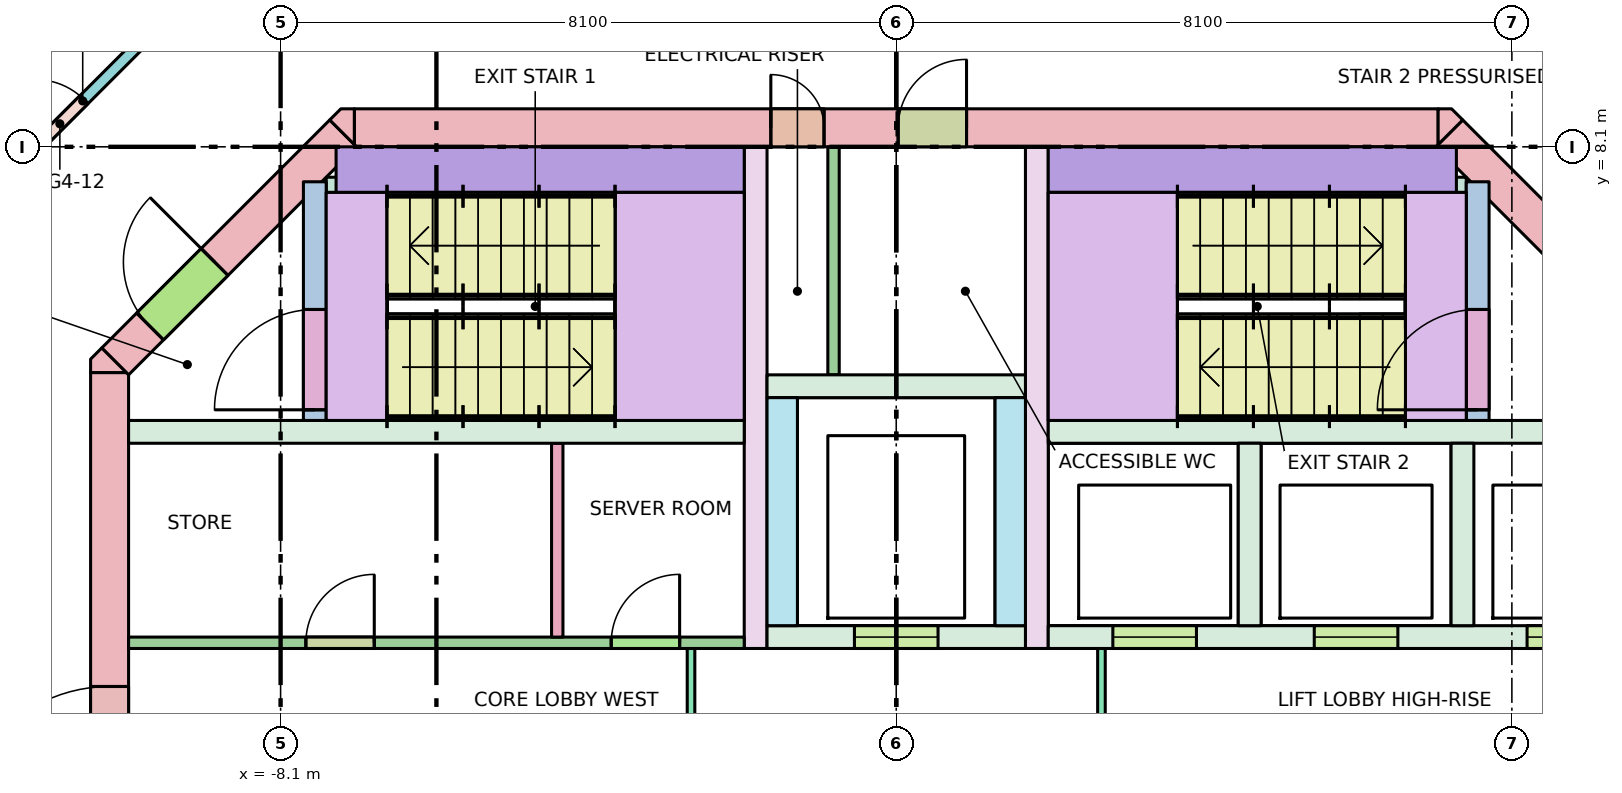
"""IFC4 building model, lengths in metres.
Left out: names, types, materials, properties, quantities, classifications, styles, units other than length and angle.
Written with IfcOpenShell. Run it as: python <this file> out.ifc"""

import sys

from ifc_helpers import new_model, si_unit, direction, frame, frame_2d, origin, place, context, subcontext, project, spatial, polyline, rectangle, outline, extrude, element, fill, save


model = new_model("IFC4")
c1 = context("Model", 3, precision=1e-05, world=origin(), true_north=direction((0.0, 1.0)))
c2 = subcontext(c1, "Body", "Model", "MODEL_VIEW")
j1 = project(units=[si_unit("LENGTHUNIT", "METRE"), si_unit("PLANEANGLEUNIT", "RADIAN")], contexts=[c1])
p1 = place(None, origin())
s1 = spatial("IfcSite", under=j1, at=p1, CompositionType="ELEMENT")
p2 = place(p1, origin())
s2 = spatial("IfcBuilding", under=s1, at=p2, CompositionType="ELEMENT")
p3 = place(p2, frame((0.0, 0.0, 276.0)))
s3 = spatial("IfcBuildingStorey", under=s2, at=p3, CompositionType="ELEMENT", Elevation=276.0)
p4 = place(p3, frame((-7.13, 8.35, -0.28), z_axis=(0.0, 0.0, 1.0), x_axis=(1.0, 0.0, 0.0)))
e1 = element("IfcWall", 1, at=p4, inside=s3, PredefinedType="SHEAR", context=c2, shape_type="SweptSolid", body=[
    extrude(rectangle(XDim=14.26, YDim=0.5, at=frame_2d((7.13, 0.0))), origin(), (0.0, 0.0, 1.0), 7.4),
])
p5 = place(p4, frame((5.48, 0.0, 0.28)))
e2 = element("IfcOpeningElement", 2, at=p5, cuts=e1, PredefinedType="OPENING", context=c2, shape_type="SweptSolid", body=[
    extrude(rectangle(XDim=0.7, YDim=2.1, at=frame_2d((0.35, 1.05))), frame((0.0, 0.26, 0.0), z_axis=(0.0, -1.0, 0.0), x_axis=(1.0, 0.0, 0.0)), (0.0, 0.0, 1.0), 0.52),
])
p6 = place(p4, frame((7.155, 0.0, 0.28)))
e3 = element("IfcOpeningElement", 3, at=p6, cuts=e1, PredefinedType="OPENING", context=c2, shape_type="SweptSolid", body=[
    extrude(rectangle(XDim=0.9, YDim=2.1, at=frame_2d((0.45, 1.05))), frame((0.0, 0.26, 0.0), z_axis=(0.0, -1.0, 0.0), x_axis=(1.0, 0.0, 0.0)), (0.0, 0.0, 1.0), 0.52),
])
p7 = place(p3, frame((-10.35, -5.13, -0.28), z_axis=(0.0, 0.0, 1.0), x_axis=(0.0, 1.0, 0.0)))
e4 = element("IfcWall", 4, at=p7, inside=s3, PredefinedType="SHEAR", context=c2, shape_type="SweptSolid", body=[
    extrude(rectangle(XDim=10.26, YDim=0.5, at=frame_2d((5.13, 0.0))), origin(), (0.0, 0.0, 1.0), 7.4),
])
p8 = place(p7, frame((4.13, 0.0, 0.28)))
e5 = element("IfcOpeningElement", 5, at=p8, cuts=e4, PredefinedType="OPENING", context=c2, shape_type="SweptSolid", body=[
    extrude(rectangle(XDim=2.0, YDim=2.1, at=frame_2d((1.0, 1.05))), frame((0.0, 0.26, 0.0), z_axis=(0.0, -1.0, 0.0), x_axis=(1.0, 0.0, 0.0)), (0.0, 0.0, 1.0), 0.52),
])
p9 = place(p3, frame((-10.277, 5.277, -0.28), z_axis=(0.0, 0.0, 1.0), x_axis=(0.707106781187, 0.707106781187, 0.0)))
e6 = element("IfcWall", 6, at=p9, inside=s3, PredefinedType="SHEAR", context=c2, shape_type="SweptSolid", body=[
    extrude(rectangle(XDim=4.243, YDim=0.5, at=frame_2d((2.121, 0.0))), origin(), (0.0, 0.0, 1.0), 7.4),
])
p10 = place(p9, frame((0.65, 0.0, 0.28)))
e7 = element("IfcOpeningElement", 7, at=p10, cuts=e6, PredefinedType="OPENING", context=c2, shape_type="SweptSolid", body=[
    extrude(rectangle(XDim=1.2, YDim=2.1, at=frame_2d((0.6, 1.05))), frame((0.0, 0.26, 0.0), z_axis=(0.0, -1.0, 0.0), x_axis=(1.0, 0.0, 0.0)), (0.0, 0.0, 1.0), 0.52),
])
p11 = place(p3, frame((7.277, 8.277, -0.28), z_axis=(0.0, 0.0, 1.0), x_axis=(0.707106781187, -0.707106781187, 0.0)))
e8 = element("IfcWall", 8, at=p11, inside=s3, PredefinedType="SHEAR", context=c2, shape_type="SweptSolid", body=[
    extrude(rectangle(XDim=4.243, YDim=0.5, at=frame_2d((2.121, 0.0))), origin(), (0.0, 0.0, 1.0), 7.4),
])
p12 = place(p11, frame((2.393, 0.0, 0.28)))
e9 = element("IfcOpeningElement", 9, at=p12, cuts=e8, PredefinedType="OPENING", context=c2, shape_type="SweptSolid", body=[
    extrude(rectangle(XDim=1.2, YDim=2.1, at=frame_2d((0.6, 1.05))), frame((0.0, 0.26, 0.0), z_axis=(0.0, -1.0, 0.0), x_axis=(1.0, 0.0, 0.0)), (0.0, 0.0, 1.0), 0.52),
])
p13 = place(p3, frame((0.0, 0.0, -0.28)))
e10 = element("IfcWall", 10, at=p13, inside=s3, PredefinedType="SHEAR", context=c2, shape_type="SweptSolid", body=[
    extrude(outline(polyline([(-10.454, 5.454), (-10.13, 5.13), (-10.6, 5.13), (-10.6, 5.307), (-10.454, 5.454)])), origin(), (0.0, 0.0, 1.0), 7.4),
])
p14 = place(p3, frame((0.0, 0.0, -0.28)))
e11 = element("IfcWall", 11, at=p14, inside=s3, PredefinedType="SHEAR", context=c2, shape_type="SweptSolid", body=[
    extrude(outline(polyline([(-7.307, 8.6), (-7.13, 8.6), (-7.13, 8.13), (-7.454, 8.454), (-7.307, 8.6)])), origin(), (0.0, 0.0, 1.0), 7.4),
])
p15 = place(p3, frame((0.0, 0.0, -0.28)))
e12 = element("IfcWall", 12, at=p15, inside=s3, PredefinedType="SHEAR", context=c2, shape_type="SweptSolid", body=[
    extrude(outline(polyline([(7.307, 8.6), (7.454, 8.454), (7.13, 8.13), (7.13, 8.6), (7.307, 8.6)])), origin(), (0.0, 0.0, 1.0), 7.4),
])
for number, where, z_axis, x_axis in (
    (13, (-10.1, 4.35, 0.0), (0.0, 0.0, 1.0), (1.0, 0.0, 0.0)),
    (14, (2.0, 4.35, 0.0), (0.0, 0.0, 1.0), (1.0, 0.0, 0.0)),
):
    element("IfcWall", number, at=place(p3, frame(where, z_axis=z_axis, x_axis=x_axis)), inside=s3, PredefinedType="SOLIDWALL", context=c2, shape_type="SweptSolid", body=[
        extrude(rectangle(XDim=8.1, YDim=0.3, at=frame_2d((4.05, 0.0))), origin(), (0.0, 0.0, 1.0), 7.12),
    ])
p16 = place(p3, frame((2.0, 1.65, 0.0), z_axis=(0.0, 0.0, 1.0), x_axis=(1.0, 0.0, 0.0)))
e15 = element("IfcWall", 15, at=p16, inside=s3, PredefinedType="SOLIDWALL", context=c2, shape_type="SweptSolid", body=[
    extrude(rectangle(XDim=8.1, YDim=0.3, at=frame_2d((4.05, 0.0))), origin(), (0.0, 0.0, 1.0), 7.12),
])
p17 = place(p16, frame((0.85, 0.0, 0.0)))
e16 = element("IfcOpeningElement", 16, at=p17, cuts=e15, PredefinedType="OPENING", context=c2, shape_type="SweptSolid", body=[
    extrude(rectangle(XDim=1.1, YDim=2.1, at=frame_2d((0.55, 1.05))), frame((0.0, 0.16, 0.0), z_axis=(0.0, -1.0, 0.0), x_axis=(1.0, 0.0, 0.0)), (0.0, 0.0, 1.0), 0.32),
])
p18 = place(p16, frame((3.5, 0.0, 0.0)))
e17 = element("IfcOpeningElement", 17, at=p18, cuts=e15, PredefinedType="OPENING", context=c2, shape_type="SweptSolid", body=[
    extrude(rectangle(XDim=1.1, YDim=2.1, at=frame_2d((0.55, 1.05))), frame((0.0, 0.16, 0.0), z_axis=(0.0, -1.0, 0.0), x_axis=(1.0, 0.0, 0.0)), (0.0, 0.0, 1.0), 0.32),
])
p19 = place(p16, frame((6.3, 0.0, 0.0)))
e18 = element("IfcOpeningElement", 18, at=p19, cuts=e15, PredefinedType="OPENING", context=c2, shape_type="SweptSolid", body=[
    extrude(rectangle(XDim=1.1, YDim=2.1, at=frame_2d((0.55, 1.05))), frame((0.0, 0.16, 0.0), z_axis=(0.0, -1.0, 0.0), x_axis=(1.0, 0.0, 0.0)), (0.0, 0.0, 1.0), 0.32),
])
for number, where, z_axis, x_axis in (
    (19, (4.65, 1.8, 0.0), (0.0, 0.0, 1.0), (0.0, 1.0, 0.0)),
    (20, (7.45, 1.8, 0.0), (0.0, 0.0, 1.0), (0.0, 1.0, 0.0)),
):
    element("IfcWall", number, at=place(p3, frame(where, z_axis=z_axis, x_axis=x_axis)), inside=s3, PredefinedType="SOLIDWALL", context=c2, shape_type="SweptSolid", body=[
        extrude(rectangle(XDim=2.4, YDim=0.3, at=frame_2d((1.2, 0.0))), origin(), (0.0, 0.0, 1.0), 7.12),
    ])
for number, where, z_axis, x_axis in (
    (21, (-1.85, 1.5, 0.0), (0.0, 0.0, 1.0), (0.0, 1.0, 0.0)),
    (22, (1.85, 1.5, 0.0), (0.0, 0.0, 1.0), (0.0, 1.0, 0.0)),
):
    element("IfcWall", number, at=place(p3, frame(where, z_axis=z_axis, x_axis=x_axis)), inside=s3, PredefinedType="SHEAR", context=c2, shape_type="SweptSolid", body=[
        extrude(rectangle(XDim=6.6, YDim=0.3, at=frame_2d((3.3, 0.0))), origin(), (0.0, 0.0, 1.0), 7.12),
    ])
p20 = place(p3, frame((-1.7, 1.65, 0.0), z_axis=(0.0, 0.0, 1.0), x_axis=(1.0, 0.0, 0.0)))
e23 = element("IfcWall", 23, at=p20, inside=s3, PredefinedType="SOLIDWALL", context=c2, shape_type="SweptSolid", body=[
    extrude(rectangle(XDim=3.4, YDim=0.3, at=frame_2d((1.7, 0.0))), origin(), (0.0, 0.0, 1.0), 7.12),
])
p21 = place(p20, frame((1.15, 0.0, 0.0)))
e24 = element("IfcOpeningElement", 24, at=p21, cuts=e23, PredefinedType="OPENING", context=c2, shape_type="SweptSolid", body=[
    extrude(rectangle(XDim=1.1, YDim=2.1, at=frame_2d((0.55, 1.05))), frame((0.0, 0.16, 0.0), z_axis=(0.0, -1.0, 0.0), x_axis=(1.0, 0.0, 0.0)), (0.0, 0.0, 1.0), 0.32),
])
for number, where, z_axis, x_axis in (
    (25, (-1.5, 1.8, 0.0), (0.0, 0.0, 1.0), (0.0, 1.0, 0.0)),
    (26, (1.5, 1.8, 0.0), (0.0, 0.0, 1.0), (0.0, 1.0, 0.0)),
):
    element("IfcWall", number, at=place(p3, frame(where, z_axis=z_axis, x_axis=x_axis)), inside=s3, PredefinedType="SOLIDWALL", context=c2, shape_type="SweptSolid", body=[
        extrude(rectangle(XDim=3.0, YDim=0.4, at=frame_2d((1.5, 0.0))), origin(), (0.0, 0.0, 1.0), 7.12),
    ])
p22 = place(p3, frame((-1.7, 4.95, 0.0), z_axis=(0.0, 0.0, 1.0), x_axis=(1.0, 0.0, 0.0)))
e27 = element("IfcWall", 27, at=p22, inside=s3, PredefinedType="SOLIDWALL", context=c2, shape_type="SweptSolid", body=[
    extrude(rectangle(XDim=3.4, YDim=0.3, at=frame_2d((1.7, 0.0))), origin(), (0.0, 0.0, 1.0), 7.12),
])
p23 = place(p3, frame((-7.65, 4.5, 0.0), z_axis=(0.0, 0.0, 1.0), x_axis=(0.0, 1.0, 0.0)))
e28 = element("IfcWall", 28, at=p23, inside=s3, PredefinedType="SHEAR", context=c2, shape_type="SweptSolid", body=[
    extrude(rectangle(XDim=3.14, YDim=0.3, at=frame_2d((1.57, 0.0))), origin(), (0.0, 0.0, 1.0), 7.12),
])
p24 = place(p23, frame((0.14, 0.0, 0.0)))
e29 = element("IfcOpeningElement", 29, at=p24, cuts=e28, PredefinedType="OPENING", context=c2, shape_type="SweptSolid", body=[
    extrude(rectangle(XDim=1.32, YDim=2.1, at=frame_2d((0.66, 1.05))), frame((0.0, 0.16, 0.0), z_axis=(0.0, -1.0, 0.0), x_axis=(1.0, 0.0, 0.0)), (0.0, 0.0, 1.0), 0.32),
])
p25 = place(p3, frame((-7.37, 7.8, 0.0), z_axis=(0.0, 0.0, 1.0), x_axis=(1.0, 0.0, 0.0)))
e30 = element("IfcWall", 30, at=p25, inside=s3, PredefinedType="SHEAR", context=c2, shape_type="SweptSolid", body=[
    extrude(rectangle(XDim=5.37, YDim=0.6, at=frame_2d((2.685, 0.0))), origin(), (0.0, 0.0, 1.0), 7.12),
])
p26 = place(p3, frame((7.65, 4.5, 0.0), z_axis=(0.0, 0.0, 1.0), x_axis=(0.0, 1.0, 0.0)))
e31 = element("IfcWall", 31, at=p26, inside=s3, PredefinedType="SHEAR", context=c2, shape_type="SweptSolid", body=[
    extrude(rectangle(XDim=3.14, YDim=0.3, at=frame_2d((1.57, 0.0))), origin(), (0.0, 0.0, 1.0), 7.12),
])
p27 = place(p26, frame((0.14, 0.0, 0.0)))
e32 = element("IfcOpeningElement", 32, at=p27, cuts=e31, PredefinedType="OPENING", context=c2, shape_type="SweptSolid", body=[
    extrude(rectangle(XDim=1.32, YDim=2.1, at=frame_2d((0.66, 1.05))), frame((0.0, 0.16, 0.0), z_axis=(0.0, -1.0, 0.0), x_axis=(1.0, 0.0, 0.0)), (0.0, 0.0, 1.0), 0.32),
])
p28 = place(p3, frame((2.0, 7.8, 0.0), z_axis=(0.0, 0.0, 1.0), x_axis=(1.0, 0.0, 0.0)))
e33 = element("IfcWall", 33, at=p28, inside=s3, PredefinedType="SHEAR", context=c2, shape_type="SweptSolid", body=[
    extrude(rectangle(XDim=5.37, YDim=0.6, at=frame_2d((2.685, 0.0))), origin(), (0.0, 0.0, 1.0), 7.12),
])
for number, where, z_axis, x_axis in (
    (34, (-7.5, 7.6, 0.0), (0.0, 0.0, 1.0), (1.0, 0.0, 0.0)),
    (35, (6.9, 7.6, 0.0), (0.0, 0.0, 1.0), (1.0, 0.0, 0.0)),
):
    element("IfcWall", number, at=place(p3, frame(where, z_axis=z_axis, x_axis=x_axis)), inside=s3, PredefinedType="SHEAR", context=c2, shape_type="SweptSolid", body=[
        extrude(rectangle(XDim=0.6, YDim=0.2, at=frame_2d((0.3, 0.0))), origin(), (0.0, 0.0, 1.0), 7.12),
    ])
p29 = place(p3, frame((-2.7, -1.5, 0.0), z_axis=(0.0, 0.0, 1.0), x_axis=(0.0, 1.0, 0.0)))
e36 = element("IfcWall", 36, at=p29, inside=s3, PredefinedType="PARTITIONING", context=c2, shape_type="SweptSolid", body=[
    extrude(rectangle(XDim=3.0, YDim=0.1, at=frame_2d((1.5, 0.0))), origin(), (0.0, 0.0, 1.0), 7.12),
])
p30 = place(p29, frame((0.9, 0.0, 0.0)))
e37 = element("IfcOpeningElement", 37, at=p30, cuts=e36, PredefinedType="OPENING", context=c2, shape_type="SweptSolid", body=[
    extrude(rectangle(XDim=1.2, YDim=2.1, at=frame_2d((0.6, 1.05))), frame((0.0, 0.06, 0.0), z_axis=(0.0, -1.0, 0.0), x_axis=(1.0, 0.0, 0.0)), (0.0, 0.0, 1.0), 0.12),
])
p31 = place(p3, frame((2.7, -1.5, 0.0), z_axis=(0.0, 0.0, 1.0), x_axis=(0.0, 1.0, 0.0)))
e38 = element("IfcWall", 38, at=p31, inside=s3, PredefinedType="PARTITIONING", context=c2, shape_type="SweptSolid", body=[
    extrude(rectangle(XDim=3.0, YDim=0.1, at=frame_2d((1.5, 0.0))), origin(), (0.0, 0.0, 1.0), 7.12),
])
p32 = place(p31, frame((0.9, 0.0, 0.0)))
e39 = element("IfcOpeningElement", 39, at=p32, cuts=e38, PredefinedType="OPENING", context=c2, shape_type="SweptSolid", body=[
    extrude(rectangle(XDim=1.2, YDim=2.1, at=frame_2d((0.6, 1.05))), frame((0.0, 0.06, 0.0), z_axis=(0.0, -1.0, 0.0), x_axis=(1.0, 0.0, 0.0)), (0.0, 0.0, 1.0), 0.12),
])
p33 = place(p3, frame((-0.825, 5.1, 0.0), z_axis=(0.0, 0.0, 1.0), x_axis=(0.0, 1.0, 0.0)))
e40 = element("IfcWall", 40, at=p33, inside=s3, PredefinedType="PARTITIONING", context=c2, shape_type="SweptSolid", body=[
    extrude(rectangle(XDim=3.0, YDim=0.15, at=frame_2d((1.5, 0.0))), origin(), (0.0, 0.0, 1.0), 7.12),
])
p34 = place(p3, frame((-4.46, 1.65, 0.0), z_axis=(0.0, 0.0, 1.0), x_axis=(0.0, 1.0, 0.0)))
e41 = element("IfcWall", 41, at=p34, inside=s3, PredefinedType="PARTITIONING", context=c2, shape_type="SweptSolid", body=[
    extrude(rectangle(XDim=2.55, YDim=0.15, at=frame_2d((1.275, 0.0))), origin(), (0.0, 0.0, 1.0), 7.12),
])
p35 = place(p3, frame((-10.1, 1.575, 0.0), z_axis=(0.0, 0.0, 1.0), x_axis=(1.0, 0.0, 0.0)))
e42 = element("IfcWall", 42, at=p35, inside=s3, PredefinedType="PARTITIONING", context=c2, shape_type="SweptSolid", body=[
    extrude(rectangle(XDim=8.1, YDim=0.15, at=frame_2d((4.05, 0.0))), origin(), (0.0, 0.0, 1.0), 7.12),
])
p36 = place(p35, frame((2.333, 0.0, 0.0)))
e43 = element("IfcOpeningElement", 43, at=p36, cuts=e42, PredefinedType="OPENING", context=c2, shape_type="SweptSolid", body=[
    extrude(rectangle(XDim=0.9, YDim=2.1, at=frame_2d((0.45, 1.05))), frame((0.0, 0.085, 0.0), z_axis=(0.0, -1.0, 0.0), x_axis=(1.0, 0.0, 0.0)), (0.0, 0.0, 1.0), 0.17),
])
p37 = place(p35, frame((6.35, 0.0, 0.0)))
e44 = element("IfcOpeningElement", 44, at=p37, cuts=e42, PredefinedType="OPENING", context=c2, shape_type="SweptSolid", body=[
    extrude(rectangle(XDim=0.9, YDim=2.1, at=frame_2d((0.45, 1.05))), frame((0.0, 0.085, 0.0), z_axis=(0.0, -1.0, 0.0), x_axis=(1.0, 0.0, 0.0)), (0.0, 0.0, 1.0), 0.17),
])
p38 = place(p3, frame((-13.038, 6.369, 0.0), z_axis=(0.0, 0.0, 1.0), x_axis=(0.707106781187, 0.707106781187, 0.0)))
e45 = element("IfcWall", 45, at=p38, inside=s3, PredefinedType="PARTITIONING", context=c2, shape_type="SweptSolid", body=[
    extrude(rectangle(XDim=6.602, YDim=0.15, at=frame_2d((3.301, 0.0))), origin(), (0.0, 0.0, 1.0), 6.27),
])
p39 = place(p38, frame((5.184, 0.0, 0.0)))
e46 = element("IfcOpeningElement", 46, at=p39, cuts=e45, PredefinedType="OPENING", context=c2, shape_type="SweptSolid", body=[
    extrude(rectangle(XDim=0.9, YDim=2.1, at=frame_2d((0.45, 1.05))), frame((0.0, 0.085, 0.0), z_axis=(0.0, -1.0, 0.0), x_axis=(1.0, 0.0, 0.0)), (0.0, 0.0, 1.0), 0.17),
])
p40 = place(p38, frame((2.426, 0.0, 0.0)))
e47 = element("IfcOpeningElement", 47, at=p40, cuts=e45, PredefinedType="OPENING", context=c2, shape_type="SweptSolid", body=[
    extrude(rectangle(XDim=0.9, YDim=2.1, at=frame_2d((0.45, 1.05))), frame((0.0, 0.085, 0.0), z_axis=(0.0, -1.0, 0.0), x_axis=(1.0, 0.0, 0.0)), (0.0, 0.0, 1.0), 0.17),
])
p41 = place(p3, frame((8.369, 11.038, 0.0), z_axis=(0.0, 0.0, 1.0), x_axis=(0.707106781187, -0.707106781187, 0.0)))
e48 = element("IfcWall", 48, at=p41, inside=s3, PredefinedType="PARTITIONING", context=c2, shape_type="SweptSolid", body=[
    extrude(rectangle(XDim=6.602, YDim=0.15, at=frame_2d((3.301, 0.0))), origin(), (0.0, 0.0, 1.0), 6.27),
])
p42 = place(p41, frame((3.719, 0.0, 0.0)))
e49 = element("IfcOpeningElement", 49, at=p42, cuts=e48, PredefinedType="OPENING", context=c2, shape_type="SweptSolid", body=[
    extrude(rectangle(XDim=1.0, YDim=2.1, at=frame_2d((0.5, 1.05))), frame((0.0, 0.085, 0.0), z_axis=(0.0, -1.0, 0.0), x_axis=(1.0, 0.0, 0.0)), (0.0, 0.0, 1.0), 0.17),
])
p43 = place(p17, origin())
e50 = element("IfcDoor", 50, at=p43, inside=s3, OperationType="DOUBLE_DOOR_SLIDING", PredefinedType="DOOR", context=c2, shape_type="SweptSolid", body=[
    extrude(rectangle(XDim=1.1, YDim=2.1, at=frame_2d((0.55, 1.05))), frame((0.0, 0.025, 0.0), z_axis=(0.0, -1.0, 0.0), x_axis=(1.0, 0.0, 0.0)), (0.0, 0.0, 1.0), 0.05),
])
fill(e16, e50)
p44 = place(p18, origin())
e51 = element("IfcDoor", 51, at=p44, inside=s3, OperationType="DOUBLE_DOOR_SLIDING", PredefinedType="DOOR", context=c2, shape_type="SweptSolid", body=[
    extrude(rectangle(XDim=1.1, YDim=2.1, at=frame_2d((0.55, 1.05))), frame((0.0, 0.025, 0.0), z_axis=(0.0, -1.0, 0.0), x_axis=(1.0, 0.0, 0.0)), (0.0, 0.0, 1.0), 0.05),
])
fill(e17, e51)
p45 = place(p19, origin())
e52 = element("IfcDoor", 52, at=p45, inside=s3, OperationType="DOUBLE_DOOR_SLIDING", PredefinedType="DOOR", context=c2, shape_type="SweptSolid", body=[
    extrude(rectangle(XDim=1.1, YDim=2.1, at=frame_2d((0.55, 1.05))), frame((0.0, 0.025, 0.0), z_axis=(0.0, -1.0, 0.0), x_axis=(1.0, 0.0, 0.0)), (0.0, 0.0, 1.0), 0.05),
])
fill(e18, e52)
p46 = place(p21, origin())
e53 = element("IfcDoor", 53, at=p46, inside=s3, OperationType="DOUBLE_DOOR_SLIDING", PredefinedType="DOOR", context=c2, shape_type="SweptSolid", body=[
    extrude(rectangle(XDim=1.1, YDim=2.1, at=frame_2d((0.55, 1.05))), frame((0.0, 0.025, 0.0), z_axis=(0.0, -1.0, 0.0), x_axis=(1.0, 0.0, 0.0)), (0.0, 0.0, 1.0), 0.05),
])
fill(e24, e53)
p47 = place(p24, origin())
e54 = element("IfcDoor", 54, at=p47, inside=s3, OperationType="DOUBLE_DOOR_SINGLE_SWING", PredefinedType="DOOR", context=c2, shape_type="SweptSolid", body=[
    extrude(rectangle(XDim=1.32, YDim=2.1, at=frame_2d((0.66, 1.05))), frame((0.0, 0.025, 0.0), z_axis=(0.0, -1.0, 0.0), x_axis=(1.0, 0.0, 0.0)), (0.0, 0.0, 1.0), 0.05),
])
fill(e29, e54)
p48 = place(p10, origin())
e55 = element("IfcDoor", 55, at=p48, inside=s3, OperationType="SINGLE_SWING_RIGHT", PredefinedType="DOOR", context=c2, shape_type="SweptSolid", body=[
    extrude(rectangle(XDim=1.2, YDim=2.1, at=frame_2d((0.6, 1.05))), frame((0.0, 0.025, 0.0), z_axis=(0.0, -1.0, 0.0), x_axis=(1.0, 0.0, 0.0)), (0.0, 0.0, 1.0), 0.05),
])
fill(e7, e55)
p49 = place(p27, origin())
e56 = element("IfcDoor", 56, at=p49, inside=s3, OperationType="DOUBLE_DOOR_SINGLE_SWING", PredefinedType="DOOR", context=c2, shape_type="SweptSolid", body=[
    extrude(rectangle(XDim=1.32, YDim=2.1, at=frame_2d((0.66, 1.05))), frame((0.0, 0.025, 0.0), z_axis=(0.0, -1.0, 0.0), x_axis=(1.0, 0.0, 0.0)), (0.0, 0.0, 1.0), 0.05),
])
fill(e32, e56)
p50 = place(p8, origin())
e57 = element("IfcDoor", 57, at=p50, inside=s3, OperationType="DOUBLE_DOOR_SINGLE_SWING", PredefinedType="DOOR", context=c2, shape_type="SweptSolid", body=[
    extrude(rectangle(XDim=2.0, YDim=2.1, at=frame_2d((1.0, 1.05))), frame((0.0, 0.025, 0.0), z_axis=(0.0, -1.0, 0.0), x_axis=(1.0, 0.0, 0.0)), (0.0, 0.0, 1.0), 0.05),
])
fill(e5, e57)
p51 = place(p5, origin())
e58 = element("IfcDoor", 58, at=p51, inside=s3, OperationType="SINGLE_SWING_LEFT", PredefinedType="DOOR", context=c2, shape_type="SweptSolid", body=[
    extrude(rectangle(XDim=0.7, YDim=2.1, at=frame_2d((0.35, 1.05))), frame((0.0, 0.025, 0.0), z_axis=(0.0, -1.0, 0.0), x_axis=(1.0, 0.0, 0.0)), (0.0, 0.0, 1.0), 0.05),
])
fill(e2, e58)
p52 = place(p6, origin())
e59 = element("IfcDoor", 59, at=p52, inside=s3, OperationType="SINGLE_SWING_RIGHT", PredefinedType="DOOR", context=c2, shape_type="SweptSolid", body=[
    extrude(rectangle(XDim=0.9, YDim=2.1, at=frame_2d((0.45, 1.05))), frame((0.0, 0.025, 0.0), z_axis=(0.0, -1.0, 0.0), x_axis=(1.0, 0.0, 0.0)), (0.0, 0.0, 1.0), 0.05),
])
fill(e3, e59)
p53 = place(p36, origin())
e60 = element("IfcDoor", 60, at=p53, inside=s3, OperationType="SINGLE_SWING_RIGHT", PredefinedType="DOOR", context=c2, shape_type="SweptSolid", body=[
    extrude(rectangle(XDim=0.9, YDim=2.1, at=frame_2d((0.45, 1.05))), frame((0.0, 0.025, 0.0), z_axis=(0.0, -1.0, 0.0), x_axis=(1.0, 0.0, 0.0)), (0.0, 0.0, 1.0), 0.05),
])
fill(e43, e60)
p54 = place(p37, origin())
e61 = element("IfcDoor", 61, at=p54, inside=s3, OperationType="SINGLE_SWING_RIGHT", PredefinedType="DOOR", context=c2, shape_type="SweptSolid", body=[
    extrude(rectangle(XDim=0.9, YDim=2.1, at=frame_2d((0.45, 1.05))), frame((0.0, 0.025, 0.0), z_axis=(0.0, -1.0, 0.0), x_axis=(1.0, 0.0, 0.0)), (0.0, 0.0, 1.0), 0.05),
])
fill(e44, e61)
p55 = place(p40, origin())
e62 = element("IfcDoor", 62, at=p55, inside=s3, OperationType="SINGLE_SWING_LEFT", PredefinedType="DOOR", context=c2, shape_type="SweptSolid", body=[
    extrude(rectangle(XDim=0.9, YDim=2.1, at=frame_2d((0.45, 1.05))), frame((0.0, 0.025, 0.0), z_axis=(0.0, -1.0, 0.0), x_axis=(1.0, 0.0, 0.0)), (0.0, 0.0, 1.0), 0.05),
])
fill(e47, e62)
save(model, sys.argv[1])
